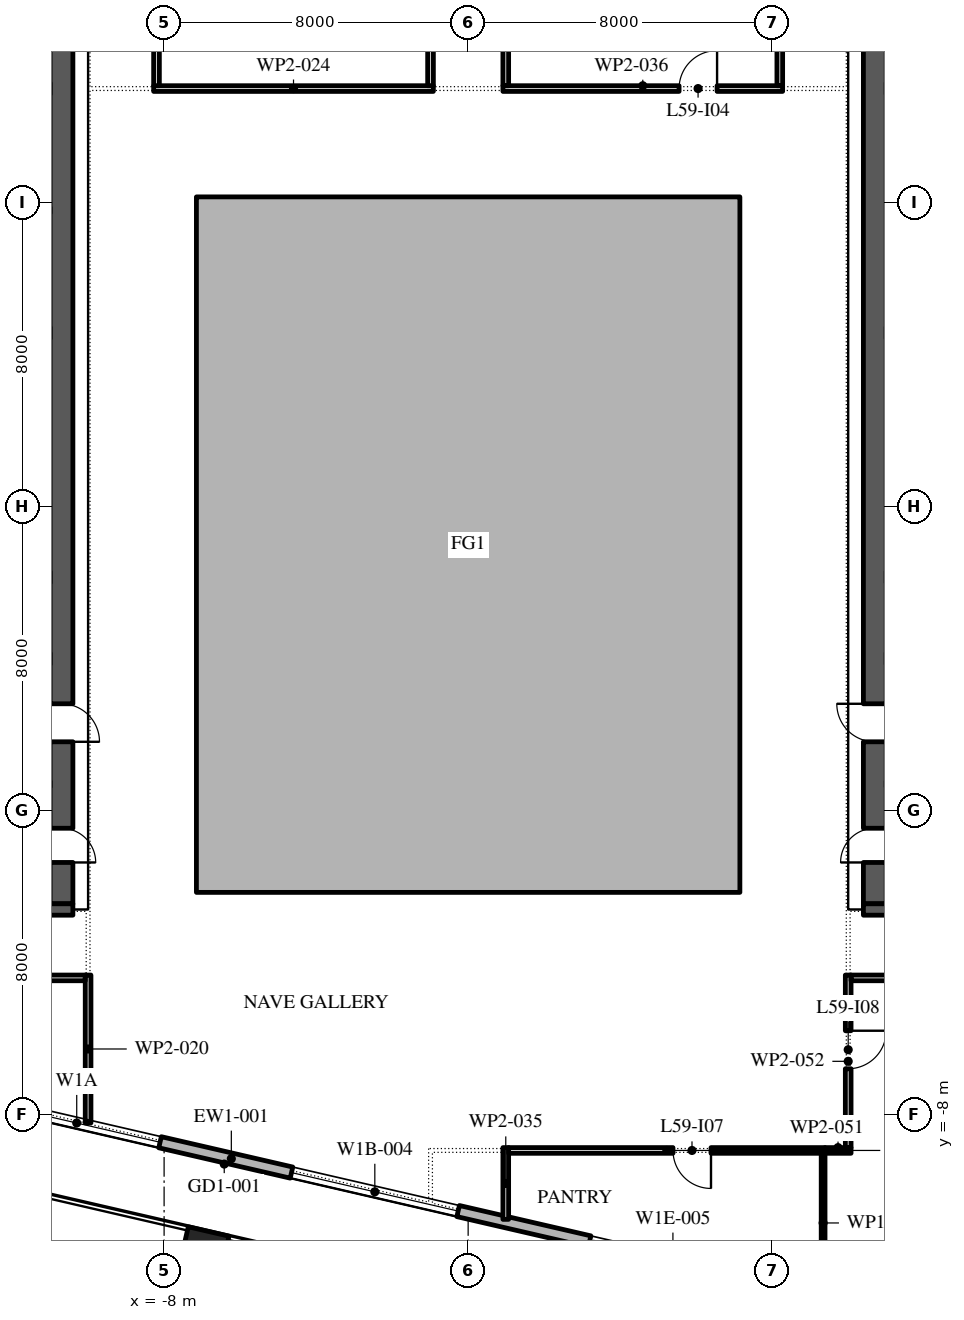
"""IFC4 building model, lengths in metres.
Left out: names, types, materials, properties, quantities, classifications, styles, units other than length and angle.
Written with IfcOpenShell. Run it as: python <this file> out.ifc"""

import sys

from ifc_helpers import new_model, si_unit, direction, frame, frame_2d, origin, origin_2d, place, context, subcontext, project, spatial, polyline, rectangle, outline, extrude, element, fill, save


model = new_model("IFC4")
c1 = context("Model", 3, precision=1e-05, world=origin(), true_north=direction((0.0, 1.0)))
c2 = subcontext(c1, "Body", "Model", "MODEL_VIEW")
j1 = project(units=[si_unit("LENGTHUNIT", "METRE"), si_unit("PLANEANGLEUNIT", "RADIAN")], contexts=[c1])
p1 = place(None, origin())
s1 = spatial("IfcSite", under=j1, at=p1, CompositionType="ELEMENT")
p2 = place(p1, origin())
s2 = spatial("IfcBuilding", under=s1, at=p2, CompositionType="ELEMENT")
p3 = place(p2, frame((0.0, 0.0, 272.4)))
s3 = spatial("IfcBuildingStorey", under=s2, at=p3, CompositionType="ELEMENT", Elevation=272.4)
p4 = place(p3, frame((-6.951, -11.608, 0.0), z_axis=(0.0, 0.0, 1.0), x_axis=(0.974370064785, -0.224951054344, 0.0)))
e1 = element("IfcColumn", 1, at=p4, inside=s3, PredefinedType="COLUMN", context=c2, shape_type="SweptSolid", body=[
    extrude(rectangle(XDim=1.1, YDim=1.1, at=origin_2d()), origin(), (0.0, 0.0, 1.0), 4.2),
])
p5 = place(p3, origin())
e2 = element("IfcWall", 2, at=p5, inside=s3, PredefinedType="STANDARD", context=c2, shape_type="SweptSolid", body=[
    extrude(outline(polyline([(-7.15, -2.15), (7.15, -2.15), (7.15, 16.15), (-7.15, 16.15), (-7.15, -2.15)]), holes=[polyline([(-7.0, -2.0), (-7.0, 16.0), (7.0, 16.0), (7.0, -2.0), (-7.0, -2.0)])]), origin(), (0.0, 0.0, 1.0), 4.0),
])
p6 = place(p3, frame((-29.616, -3.758, 0.0), z_axis=(0.0, 0.0, 1.0), x_axis=(0.974370532314, -0.224949029246, 0.0)))
e3 = element("IfcWall", 3, at=p6, inside=s3, PredefinedType="STANDARD", context=c2, shape_type="SweptSolid", body=[
    extrude(rectangle(XDim=48.0, YDim=0.3, at=frame_2d((24.0, 0.0))), origin(), (0.0, 0.0, 1.0), 4.0),
])
p7 = place(p6, frame((1.625, 0.0, 0.45)))
e4 = element("IfcOpeningElement", 4, at=p7, cuts=e3, PredefinedType="OPENING", context=c2, shape_type="SweptSolid", body=[
    extrude(rectangle(XDim=4.5, YDim=3.05, at=frame_2d((2.25, 1.525))), frame((0.0, 0.16, 0.0), z_axis=(0.0, -1.0, 0.0), x_axis=(1.0, 0.0, 0.0)), (0.0, 0.0, 1.0), 0.32),
])
p8 = place(p6, frame((10.575, 0.0, 0.0)))
e5 = element("IfcOpeningElement", 5, at=p8, cuts=e3, PredefinedType="OPENING", context=c2, shape_type="SweptSolid", body=[
    extrude(rectangle(XDim=2.4, YDim=3.5, at=frame_2d((1.2, 1.75))), frame((0.0, 0.16, 0.0), z_axis=(0.0, -1.0, 0.0), x_axis=(1.0, 0.0, 0.0)), (0.0, 0.0, 1.0), 0.32),
])
p9 = place(p6, frame((17.575, 0.0, 0.45)))
e6 = element("IfcOpeningElement", 6, at=p9, cuts=e3, PredefinedType="OPENING", context=c2, shape_type="SweptSolid", body=[
    extrude(rectangle(XDim=4.5, YDim=3.0, at=frame_2d((2.25, 1.5))), frame((0.0, 0.16, 0.0), z_axis=(0.0, -1.0, 0.0), x_axis=(1.0, 0.0, 0.0)), (0.0, 0.0, 1.0), 0.32),
])
p10 = place(p6, frame((25.625, 0.0, 0.45)))
e7 = element("IfcOpeningElement", 7, at=p10, cuts=e3, PredefinedType="OPENING", context=c2, shape_type="SweptSolid", body=[
    extrude(rectangle(XDim=4.5, YDim=2.95, at=frame_2d((2.25, 1.475))), frame((0.0, 0.16, 0.0), z_axis=(0.0, -1.0, 0.0), x_axis=(1.0, 0.0, 0.0)), (0.0, 0.0, 1.0), 0.32),
])
p11 = place(p6, frame((33.675, 0.0, 0.45)))
e8 = element("IfcOpeningElement", 8, at=p11, cuts=e3, PredefinedType="OPENING", context=c2, shape_type="SweptSolid", body=[
    extrude(rectangle(XDim=4.5, YDim=2.825, at=frame_2d((2.25, 1.413))), frame((0.0, 0.16, 0.0), z_axis=(0.0, -1.0, 0.0), x_axis=(1.0, 0.0, 0.0)), (0.0, 0.0, 1.0), 0.32),
])
p12 = place(p6, frame((42.175, 0.0, 0.0)))
e9 = element("IfcOpeningElement", 9, at=p12, cuts=e3, PredefinedType="OPENING", context=c2, shape_type="SweptSolid", body=[
    extrude(rectangle(XDim=2.4, YDim=3.5, at=frame_2d((1.2, 1.75))), frame((0.0, 0.16, 0.0), z_axis=(0.0, -1.0, 0.0), x_axis=(1.0, 0.0, 0.0)), (0.0, 0.0, 1.0), 0.32),
])
p13 = place(p3, frame((-10.7, -2.45, 0.0), z_axis=(0.0, 0.0, 1.0), x_axis=(0.0, 1.0, 0.0)))
e10 = element("IfcWall", 10, at=p13, inside=s3, PredefinedType="SHEAR", context=c2, shape_type="SweptSolid", body=[
    extrude(rectangle(XDim=27.9, YDim=0.6, at=frame_2d((13.95, 0.0))), origin(), (0.0, 0.0, 1.0), 4.0),
])
p14 = place(p13, frame((23.65, 0.0, 0.0)))
e11 = element("IfcOpeningElement", 11, at=p14, cuts=e10, PredefinedType="OPENING", context=c2, shape_type="SweptSolid", body=[
    extrude(rectangle(XDim=2.4, YDim=2.1, at=frame_2d((1.2, 1.05))), frame((0.0, 0.31, 0.0), z_axis=(0.0, -1.0, 0.0), x_axis=(1.0, 0.0, 0.0)), (0.0, 0.0, 1.0), 0.62),
])
p15 = place(p13, frame((1.087, 0.0, 0.0)))
e12 = element("IfcOpeningElement", 12, at=p15, cuts=e10, PredefinedType="OPENING", context=c2, shape_type="SweptSolid", body=[
    extrude(rectangle(XDim=0.9, YDim=2.1, at=frame_2d((0.45, 1.05))), frame((0.0, 0.31, 0.0), z_axis=(0.0, -1.0, 0.0), x_axis=(1.0, 0.0, 0.0)), (0.0, 0.0, 1.0), 0.62),
])
p16 = place(p13, frame((4.262, 0.0, 0.0)))
e13 = element("IfcOpeningElement", 13, at=p16, cuts=e10, PredefinedType="OPENING", context=c2, shape_type="SweptSolid", body=[
    extrude(rectangle(XDim=1.0, YDim=2.1, at=frame_2d((0.5, 1.05))), frame((0.0, 0.31, 0.0), z_axis=(0.0, -1.0, 0.0), x_axis=(1.0, 0.0, 0.0)), (0.0, 0.0, 1.0), 0.62),
])
p17 = place(p3, frame((-21.6, -2.6, 0.0), z_axis=(0.0, 0.0, 1.0), x_axis=(1.0, 0.0, 0.0)))
e14 = element("IfcWall", 14, at=p17, inside=s3, PredefinedType="SHEAR", context=c2, shape_type="SweptSolid", body=[
    extrude(rectangle(XDim=11.2, YDim=0.3, at=frame_2d((5.6, 0.0))), origin(), (0.0, 0.0, 1.0), 4.0),
])
p18 = place(p3, frame((10.7, -2.45, 0.0), z_axis=(0.0, 0.0, 1.0), x_axis=(0.0, 1.0, 0.0)))
e15 = element("IfcWall", 15, at=p18, inside=s3, PredefinedType="SHEAR", context=c2, shape_type="SweptSolid", body=[
    extrude(rectangle(XDim=27.9, YDim=0.6, at=frame_2d((13.95, 0.0))), origin(), (0.0, 0.0, 1.0), 4.0),
])
p19 = place(p18, frame((23.65, 0.0, 0.0)))
e16 = element("IfcOpeningElement", 16, at=p19, cuts=e15, PredefinedType="OPENING", context=c2, shape_type="SweptSolid", body=[
    extrude(rectangle(XDim=2.4, YDim=2.1, at=frame_2d((1.2, 1.05))), frame((0.0, 0.31, 0.0), z_axis=(0.0, -1.0, 0.0), x_axis=(1.0, 0.0, 0.0)), (0.0, 0.0, 1.0), 0.62),
])
p20 = place(p18, frame((1.087, 0.0, 0.0)))
e17 = element("IfcOpeningElement", 17, at=p20, cuts=e15, PredefinedType="OPENING", context=c2, shape_type="SweptSolid", body=[
    extrude(rectangle(XDim=0.9, YDim=2.1, at=frame_2d((0.45, 1.05))), frame((0.0, 0.31, 0.0), z_axis=(0.0, -1.0, 0.0), x_axis=(1.0, 0.0, 0.0)), (0.0, 0.0, 1.0), 0.62),
])
p21 = place(p18, frame((4.262, 0.0, 0.0)))
e18 = element("IfcOpeningElement", 18, at=p21, cuts=e15, PredefinedType="OPENING", context=c2, shape_type="SweptSolid", body=[
    extrude(rectangle(XDim=1.0, YDim=2.1, at=frame_2d((0.5, 1.05))), frame((0.0, 0.31, 0.0), z_axis=(0.0, -1.0, 0.0), x_axis=(1.0, 0.0, 0.0)), (0.0, 0.0, 1.0), 0.62),
])
p22 = place(p3, frame((10.4, -2.6, 0.0), z_axis=(0.0, 0.0, 1.0), x_axis=(1.0, 0.0, 0.0)))
e19 = element("IfcWall", 19, at=p22, inside=s3, PredefinedType="SHEAR", context=c2, shape_type="SweptSolid", body=[
    extrude(rectangle(XDim=11.2, YDim=0.3, at=frame_2d((5.6, 0.0))), origin(), (0.0, 0.0, 1.0), 4.0),
])
p23 = place(p3, frame((-10.0, -8.216, 0.0), z_axis=(0.0, 0.0, 1.0), x_axis=(0.0, 1.0, 0.0)))
e20 = element("IfcWall", 20, at=p23, inside=s3, PredefinedType="PARTITIONING", context=c2, shape_type="SweptSolid", body=[
    extrude(rectangle(XDim=3.891, YDim=0.15, at=frame_2d((1.946, 0.0))), origin(), (0.0, 0.0, 1.0), 4.0),
])
p24 = place(p3, frame((-10.075, -4.4, 0.0), z_axis=(0.0, 0.0, 1.0), x_axis=(-1.0, 0.0, 0.0)))
e21 = element("IfcWall", 21, at=p24, inside=s3, PredefinedType="PARTITIONING", context=c2, shape_type="SweptSolid", body=[
    extrude(rectangle(XDim=13.64, YDim=0.15, at=frame_2d((6.82, 0.0))), origin(), (0.0, 0.0, 1.0), 4.0),
])
p25 = place(p24, frame((9.065, 0.0, 0.0)))
e22 = element("IfcOpeningElement", 22, at=p25, cuts=e21, PredefinedType="OPENING", context=c2, shape_type="SweptSolid", body=[
    extrude(rectangle(XDim=1.0, YDim=2.1, at=frame_2d((0.5, 1.05))), frame((0.0, 0.085, 0.0), z_axis=(0.0, -1.0, 0.0), x_axis=(1.0, 0.0, 0.0)), (0.0, 0.0, 1.0), 0.17),
])
p26 = place(p3, frame((-8.275, 19.0, 0.0), z_axis=(0.0, 0.0, 1.0), x_axis=(1.0, 0.0, 0.0)))
e23 = element("IfcWall", 23, at=p26, inside=s3, PredefinedType="PARTITIONING", context=c2, shape_type="SweptSolid", body=[
    extrude(rectangle(XDim=7.36, YDim=0.15, at=frame_2d((3.68, 0.0))), origin(), (0.0, 0.0, 1.0), 4.0),
])
p27 = place(p3, frame((-8.2, 29.71, 0.0), z_axis=(0.0, 0.0, 1.0), x_axis=(0.0, -1.0, 0.0)))
e24 = element("IfcWall", 24, at=p27, inside=s3, PredefinedType="PARTITIONING", context=c2, shape_type="SweptSolid", body=[
    extrude(rectangle(XDim=10.635, YDim=0.15, at=frame_2d((5.317, 0.0))), origin(), (0.0, 0.0, 1.0), 4.0),
])
p28 = place(p27, frame((2.81, 0.0, 0.0)))
e25 = element("IfcOpeningElement", 25, at=p28, cuts=e24, PredefinedType="OPENING", context=c2, shape_type="SweptSolid", body=[
    extrude(rectangle(XDim=1.0, YDim=2.1, at=frame_2d((0.5, 1.05))), frame((0.0, 0.085, 0.0), z_axis=(0.0, -1.0, 0.0), x_axis=(1.0, 0.0, 0.0)), (0.0, 0.0, 1.0), 0.17),
])
p29 = place(p3, frame((-0.99, 19.075, 0.0), z_axis=(0.0, 0.0, 1.0), x_axis=(0.0, 1.0, 0.0)))
e26 = element("IfcWall", 26, at=p29, inside=s3, PredefinedType="PARTITIONING", context=c2, shape_type="SweptSolid", body=[
    extrude(rectangle(XDim=10.535, YDim=0.15, at=frame_2d((5.268, 0.0))), origin(), (0.0, 0.0, 1.0), 4.0),
])
p30 = place(p3, frame((0.99, -8.865, 0.0), z_axis=(0.0, 0.0, 1.0), x_axis=(0.0, -1.0, 0.0)))
e27 = element("IfcWall", 27, at=p30, inside=s3, PredefinedType="PARTITIONING", context=c2, shape_type="SweptSolid", body=[
    extrude(rectangle(XDim=1.888, YDim=0.15, at=frame_2d((0.944, 0.0))), origin(), (0.0, 0.0, 1.0), 4.0),
])
p31 = place(p3, frame((0.915, 19.0, 0.0), z_axis=(0.0, 0.0, 1.0), x_axis=(1.0, 0.0, 0.0)))
e28 = element("IfcWall", 28, at=p31, inside=s3, PredefinedType="PARTITIONING", context=c2, shape_type="SweptSolid", body=[
    extrude(rectangle(XDim=7.36, YDim=0.15, at=frame_2d((3.68, 0.0))), origin(), (0.0, 0.0, 1.0), 4.0),
])
p32 = place(p31, frame((4.635, 0.0, 0.0)))
e29 = element("IfcOpeningElement", 29, at=p32, cuts=e28, PredefinedType="OPENING", context=c2, shape_type="SweptSolid", body=[
    extrude(rectangle(XDim=1.0, YDim=2.1, at=frame_2d((0.5, 1.05))), frame((0.0, 0.085, 0.0), z_axis=(0.0, -1.0, 0.0), x_axis=(1.0, 0.0, 0.0)), (0.0, 0.0, 1.0), 0.17),
])
p33 = place(p3, frame((0.99, 24.5, 0.0), z_axis=(0.0, 0.0, 1.0), x_axis=(0.0, -1.0, 0.0)))
e30 = element("IfcWall", 30, at=p33, inside=s3, PredefinedType="PARTITIONING", context=c2, shape_type="SweptSolid", body=[
    extrude(rectangle(XDim=5.425, YDim=0.15, at=frame_2d((2.712, 0.0))), origin(), (0.0, 0.0, 1.0), 4.0),
])
p34 = place(p3, frame((8.2, 19.075, 0.0), z_axis=(0.0, 0.0, 1.0), x_axis=(0.0, 1.0, 0.0)))
e31 = element("IfcWall", 31, at=p34, inside=s3, PredefinedType="PARTITIONING", context=c2, shape_type="SweptSolid", body=[
    extrude(rectangle(XDim=5.375, YDim=0.15, at=frame_2d((2.688, 0.0))), origin(), (0.0, 0.0, 1.0), 4.0),
])
p35 = place(p3, frame((9.39, -8.94, 0.0), z_axis=(0.0, 0.0, 1.0), x_axis=(-1.0, 0.0, 0.0)))
e32 = element("IfcWall", 32, at=p35, inside=s3, PredefinedType="PARTITIONING", context=c2, shape_type="SweptSolid", body=[
    extrude(rectangle(XDim=8.325, YDim=0.15, at=frame_2d((4.163, 0.0))), origin(), (0.0, 0.0, 1.0), 4.0),
])
p36 = place(p35, frame((3.0, 0.0, 0.0)))
e33 = element("IfcOpeningElement", 33, at=p36, cuts=e32, PredefinedType="OPENING", context=c2, shape_type="SweptSolid", body=[
    extrude(rectangle(XDim=1.0, YDim=2.1, at=frame_2d((0.5, 1.05))), frame((0.0, 0.085, 0.0), z_axis=(0.0, -1.0, 0.0), x_axis=(1.0, 0.0, 0.0)), (0.0, 0.0, 1.0), 0.17),
])
p37 = place(p3, frame((9.34, -9.015, 0.0), z_axis=(0.0, 0.0, 1.0), x_axis=(0.0, -1.0, 0.0)))
e34 = element("IfcWall", 34, at=p37, inside=s3, PredefinedType="PARTITIONING", context=c2, shape_type="SweptSolid", body=[
    extrude(rectangle(XDim=3.666, YDim=0.1, at=frame_2d((1.833, 0.0))), origin(), (0.0, 0.0, 1.0), 4.0),
])
p38 = place(p3, frame((10.075, -8.94, 0.0), z_axis=(0.0, 0.0, 1.0), x_axis=(-1.0, 0.0, 0.0)))
e35 = element("IfcWall", 35, at=p38, inside=s3, PredefinedType="PARTITIONING", context=c2, shape_type="SweptSolid", body=[
    extrude(rectangle(XDim=0.685, YDim=0.15, at=frame_2d((0.343, 0.0))), origin(), (0.0, 0.0, 1.0), 4.0),
])
p39 = place(p3, frame((10.0, -4.325, 0.0), z_axis=(0.0, 0.0, 1.0), x_axis=(0.0, -1.0, 0.0)))
e36 = element("IfcWall", 36, at=p39, inside=s3, PredefinedType="PARTITIONING", context=c2, shape_type="SweptSolid", body=[
    extrude(rectangle(XDim=4.54, YDim=0.15, at=frame_2d((2.27, 0.0))), origin(), (0.0, 0.0, 1.0), 4.0),
])
p40 = place(p39, frame((1.465, 0.0, 0.0)))
e37 = element("IfcOpeningElement", 37, at=p40, cuts=e36, PredefinedType="OPENING", context=c2, shape_type="SweptSolid", body=[
    extrude(rectangle(XDim=1.0, YDim=2.1, at=frame_2d((0.5, 1.05))), frame((0.0, 0.085, 0.0), z_axis=(0.0, -1.0, 0.0), x_axis=(1.0, 0.0, 0.0)), (0.0, 0.0, 1.0), 0.17),
])
p41 = place(p3, frame((14.19, -4.4, 0.0), z_axis=(0.0, 0.0, 1.0), x_axis=(-1.0, 0.0, 0.0)))
e38 = element("IfcWall", 38, at=p41, inside=s3, PredefinedType="PARTITIONING", context=c2, shape_type="SweptSolid", body=[
    extrude(rectangle(XDim=4.115, YDim=0.15, at=frame_2d((2.058, 0.0))), origin(), (0.0, 0.0, 1.0), 4.0),
])
p42 = place(p9, origin())
e39 = element("IfcWindow", 39, at=p42, inside=s3, PartitioningType="DOUBLE_PANEL_VERTICAL", PredefinedType="WINDOW", context=c2, shape_type="SweptSolid", body=[
    extrude(rectangle(XDim=4.5, YDim=3.0, at=frame_2d((2.25, 1.5))), frame((0.0, 0.03, 0.0), z_axis=(0.0, -1.0, 0.0), x_axis=(1.0, 0.0, 0.0)), (0.0, 0.0, 1.0), 0.06),
])
fill(e6, e39)
p43 = place(p10, origin())
e40 = element("IfcWindow", 40, at=p43, inside=s3, PartitioningType="DOUBLE_PANEL_VERTICAL", PredefinedType="WINDOW", context=c2, shape_type="SweptSolid", body=[
    extrude(rectangle(XDim=4.5, YDim=2.95, at=frame_2d((2.25, 1.475))), frame((0.0, 0.03, 0.0), z_axis=(0.0, -1.0, 0.0), x_axis=(1.0, 0.0, 0.0)), (0.0, 0.0, 1.0), 0.06),
])
fill(e7, e40)
p44 = place(p32, origin())
e41 = element("IfcDoor", 41, at=p44, inside=s3, OperationType="SINGLE_SWING_LEFT", PredefinedType="DOOR", context=c2, shape_type="SweptSolid", body=[
    extrude(rectangle(XDim=1.0, YDim=2.1, at=frame_2d((0.5, 1.05))), frame((0.0, 0.025, 0.0), z_axis=(0.0, -1.0, 0.0), x_axis=(1.0, 0.0, 0.0)), (0.0, 0.0, 1.0), 0.05),
])
fill(e29, e41)
p45 = place(p36, origin())
e42 = element("IfcDoor", 42, at=p45, inside=s3, OperationType="SINGLE_SWING_RIGHT", PredefinedType="DOOR", context=c2, shape_type="SweptSolid", body=[
    extrude(rectangle(XDim=1.0, YDim=2.1, at=frame_2d((0.5, 1.05))), frame((0.0, 0.025, 0.0), z_axis=(0.0, -1.0, 0.0), x_axis=(1.0, 0.0, 0.0)), (0.0, 0.0, 1.0), 0.05),
])
fill(e33, e42)
p46 = place(p40, origin())
e43 = element("IfcDoor", 43, at=p46, inside=s3, OperationType="SINGLE_SWING_RIGHT", PredefinedType="DOOR", context=c2, shape_type="SweptSolid", body=[
    extrude(rectangle(XDim=1.0, YDim=2.1, at=frame_2d((0.5, 1.05))), frame((0.0, 0.025, 0.0), z_axis=(0.0, -1.0, 0.0), x_axis=(1.0, 0.0, 0.0)), (0.0, 0.0, 1.0), 0.05),
])
fill(e37, e43)
save(model, sys.argv[1])
